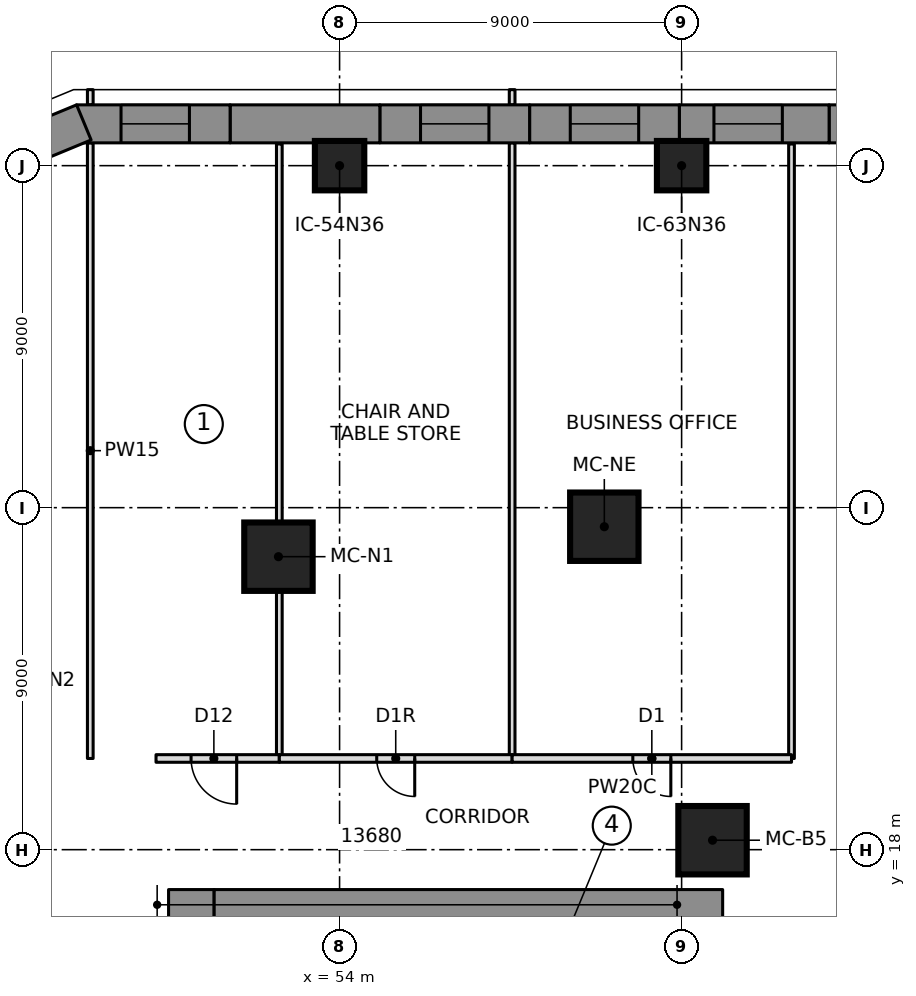
"""IFC4 building model, lengths in metres.
Left out: names, types, materials, properties, quantities, classifications, styles, units other than length and angle.
Written with IfcOpenShell. Run it as: python <this file> out.ifc"""

import sys

from ifc_helpers import new_model, si_unit, direction, frame, frame_2d, origin, origin_2d, place, context, subcontext, project, spatial, polyline, rectangle, outline, extrude, element, fill, save


model = new_model("IFC4")
c1 = context("Model", 3, precision=1e-05, world=origin(), true_north=direction((0.0, 1.0)))
c2 = subcontext(c1, "Body", "Model", "MODEL_VIEW")
j1 = project(units=[si_unit("LENGTHUNIT", "METRE"), si_unit("PLANEANGLEUNIT", "RADIAN")], contexts=[c1])
p1 = place(None, origin())
s1 = spatial("IfcSite", under=j1, at=p1, CompositionType="ELEMENT")
p2 = place(p1, origin())
s2 = spatial("IfcBuilding", under=s1, at=p2, CompositionType="ELEMENT")
p3 = place(p2, frame((0.0, 0.0, 8.0)))
s3 = spatial("IfcBuildingStorey", under=s2, at=p3, CompositionType="ELEMENT", Elevation=8.0)
p4 = place(p3, frame((50.1, 6.65, 0.0), z_axis=(0.0, 0.0, 1.0), x_axis=(0.0, 1.0, 0.0)))
e1 = element("IfcWall", 1, at=p4, inside=s3, PredefinedType="SHEAR", context=c2, shape_type="SweptSolid", body=[
    extrude(rectangle(XDim=10.3, YDim=1.2, at=frame_2d((5.15, 0.0))), origin(), (0.0, 0.0, 1.0), 5.5),
])
p5 = place(p4, frame((6.5, 0.0, 0.0)))
e2 = element("IfcOpeningElement", 2, at=p5, cuts=e1, PredefinedType="OPENING", context=c2, shape_type="SweptSolid", body=[
    extrude(rectangle(XDim=1.1, YDim=2.1, at=frame_2d((0.55, 1.05))), frame((0.0, 0.61, 0.0), z_axis=(0.0, -1.0, 0.0), x_axis=(1.0, 0.0, 0.0)), (0.0, 0.0, 1.0), 1.22),
])
p6 = place(p3, frame((50.7, 16.35, 0.0), z_axis=(0.0, 0.0, 1.0), x_axis=(1.0, 0.0, 0.0)))
e3 = element("IfcWall", 3, at=p6, inside=s3, PredefinedType="SHEAR", context=c2, shape_type="SweptSolid", body=[
    extrude(rectangle(XDim=13.38, YDim=1.2, at=frame_2d((6.69, 0.0))), origin(), (0.0, 0.0, 1.0), 5.5),
])
for number, where, z_axis, x_axis in (
    (4, (63.813, 18.249, 0.0), (0.0, 0.0, 1.0), (1.0, 0.0, 0.0)),
    (5, (60.966, 26.499, 0.0), (0.0, 0.0, 1.0), (1.0, 0.0, 0.0)),
    (6, (52.392, 25.71, 0.0), (0.0, 0.0, 1.0), (1.0, 0.0, 0.0)),
):
    element("IfcColumn", number, at=place(p3, frame(where, z_axis=z_axis, x_axis=x_axis)), inside=s3, PredefinedType="COLUMN", context=c2, shape_type="SweptSolid", body=[
        extrude(rectangle(XDim=1.8, YDim=1.8, at=origin_2d()), origin(), (0.0, 0.0, 1.0), 5.5),
    ])
for number, where, z_axis, x_axis in (
    (7, (54.0, 36.0, 0.0), (0.0, 0.0, 1.0), (1.0, 0.0, 0.0)),
    (8, (63.0, 36.0, 0.0), (0.0, 0.0, 1.0), (1.0, 0.0, 0.0)),
):
    element("IfcColumn", number, at=place(p3, frame(where, z_axis=z_axis, x_axis=x_axis)), inside=s3, PredefinedType="COLUMN", context=c2, shape_type="SweptSolid", body=[
        extrude(rectangle(XDim=1.3, YDim=1.3, at=origin_2d()), origin(), (0.0, 0.0, 1.0), 5.5),
    ])
p7 = place(p3, frame((70.821, 37.1, 0.0), z_axis=(0.0, 0.0, 1.0), x_axis=(-1.0, 0.0, 0.0)))
e9 = element("IfcWall", 9, at=p7, inside=s3, PredefinedType="NOTDEFINED", context=c2, shape_type="SweptSolid", body=[
    extrude(outline(polyline([(-0.1, -0.5), (3.94, -0.5), (3.94, 0.5), (0.1, 0.5), (-0.1, -0.5)])), origin(), (0.0, 0.0, 1.0), 5.2),
])
p8 = place(p7, frame((1.07, 0.0, 0.9)))
e10 = element("IfcOpeningElement", 10, at=p8, cuts=e9, PredefinedType="OPENING", context=c2, shape_type="SweptSolid", body=[
    extrude(rectangle(XDim=1.8, YDim=2.4, at=frame_2d((0.9, 1.2))), frame((0.0, 0.51, 0.0), z_axis=(0.0, -1.0, 0.0), x_axis=(1.0, 0.0, 0.0)), (0.0, 0.0, 1.0), 1.02),
])
p9 = place(p3, frame((66.881, 37.1, 0.0), z_axis=(0.0, 0.0, 1.0), x_axis=(-1.0, 0.0, 0.0)))
e11 = element("IfcWall", 11, at=p9, inside=s3, PredefinedType="NOTDEFINED", context=c2, shape_type="SweptSolid", body=[
    extrude(outline(polyline([(0.0, -0.5), (3.94, -0.5), (3.94, 0.5), (0.0, 0.5), (0.0, -0.5)])), origin(), (0.0, 0.0, 1.0), 5.2),
])
p10 = place(p9, frame((1.23, 0.0, 0.9)))
e12 = element("IfcOpeningElement", 12, at=p10, cuts=e11, PredefinedType="OPENING", context=c2, shape_type="SweptSolid", body=[
    extrude(rectangle(XDim=1.8, YDim=2.4, at=frame_2d((0.9, 1.2))), frame((0.0, 0.51, 0.0), z_axis=(0.0, -1.0, 0.0), x_axis=(1.0, 0.0, 0.0)), (0.0, 0.0, 1.0), 1.02),
])
p11 = place(p3, frame((62.94, 37.1, 0.0), z_axis=(0.0, 0.0, 1.0), x_axis=(-1.0, 0.0, 0.0)))
e13 = element("IfcWall", 13, at=p11, inside=s3, PredefinedType="NOTDEFINED", context=c2, shape_type="SweptSolid", body=[
    extrude(outline(polyline([(0.0, -0.5), (3.94, -0.5), (3.94, 0.5), (0.0, 0.5), (0.0, -0.5)])), origin(), (0.0, 0.0, 1.0), 5.2),
])
p12 = place(p11, frame((1.07, 0.0, 0.9)))
e14 = element("IfcOpeningElement", 14, at=p12, cuts=e13, PredefinedType="OPENING", context=c2, shape_type="SweptSolid", body=[
    extrude(rectangle(XDim=1.8, YDim=2.4, at=frame_2d((0.9, 1.2))), frame((0.0, 0.51, 0.0), z_axis=(0.0, -1.0, 0.0), x_axis=(1.0, 0.0, 0.0)), (0.0, 0.0, 1.0), 1.02),
])
p13 = place(p3, frame((59.0, 37.1, 0.0), z_axis=(0.0, 0.0, 1.0), x_axis=(-1.0, 0.0, 0.0)))
e15 = element("IfcWall", 15, at=p13, inside=s3, PredefinedType="NOTDEFINED", context=c2, shape_type="SweptSolid", body=[
    extrude(outline(polyline([(0.0, -0.5), (3.94, -0.5), (3.94, 0.5), (0.0, 0.5), (0.0, -0.5)])), origin(), (0.0, 0.0, 1.0), 5.2),
])
p14 = place(p13, frame((1.07, 0.0, 0.9)))
e16 = element("IfcOpeningElement", 16, at=p14, cuts=e15, PredefinedType="OPENING", context=c2, shape_type="SweptSolid", body=[
    extrude(rectangle(XDim=1.8, YDim=2.4, at=frame_2d((0.9, 1.2))), frame((0.0, 0.51, 0.0), z_axis=(0.0, -1.0, 0.0), x_axis=(1.0, 0.0, 0.0)), (0.0, 0.0, 1.0), 1.02),
])
p15 = place(p3, frame((55.06, 37.1, 0.0), z_axis=(0.0, 0.0, 1.0), x_axis=(-1.0, 0.0, 0.0)))
e17 = element("IfcWall", 17, at=p15, inside=s3, PredefinedType="NOTDEFINED", context=c2, shape_type="SweptSolid", body=[
    extrude(outline(polyline([(0.0, -0.5), (3.94, -0.5), (3.94, 0.5), (0.0, 0.5), (0.0, -0.5)])), origin(), (0.0, 0.0, 1.0), 5.2),
])
p16 = place(p3, frame((51.119, 37.1, 0.0), z_axis=(0.0, 0.0, 1.0), x_axis=(-1.0, 0.0, 0.0)))
e18 = element("IfcWall", 18, at=p16, inside=s3, PredefinedType="NOTDEFINED", context=c2, shape_type="SweptSolid", body=[
    extrude(outline(polyline([(0.0, -0.5), (4.04, -0.5), (3.841, 0.5), (0.0, 0.5), (0.0, -0.5)])), origin(), (0.0, 0.0, 1.0), 5.2),
])
p17 = place(p16, frame((1.07, 0.0, 0.9)))
e19 = element("IfcOpeningElement", 19, at=p17, cuts=e18, PredefinedType="OPENING", context=c2, shape_type="SweptSolid", body=[
    extrude(rectangle(XDim=1.8, YDim=2.4, at=frame_2d((0.9, 1.2))), frame((0.0, 0.51, 0.0), z_axis=(0.0, -1.0, 0.0), x_axis=(1.0, 0.0, 0.0)), (0.0, 0.0, 1.0), 1.02),
])
p18 = place(p3, frame((47.179, 37.1, 0.0), z_axis=(0.0, 0.0, 1.0), x_axis=(-0.923862365102, -0.382724875529, 0.0)))
e20 = element("IfcWall", 20, at=p18, inside=s3, PredefinedType="NOTDEFINED", context=c2, shape_type="SweptSolid", body=[
    extrude(outline(polyline([(-0.1, -0.5), (3.482, -0.5), (3.068, 0.5), (0.1, 0.5), (-0.1, -0.5)])), origin(), (0.0, 0.0, 1.0), 5.2),
])
p19 = place(p3, frame((47.44, 20.4, 0.0), z_axis=(0.0, 0.0, 1.0), x_axis=(0.0, 1.0, 0.0)))
e21 = element("IfcWall", 21, at=p19, inside=s3, PredefinedType="PARTITIONING", context=c2, shape_type="SweptSolid", body=[
    extrude(rectangle(XDim=16.2, YDim=0.15, at=frame_2d((8.1, 0.0))), origin(), (0.0, 0.0, 1.0), 5.15),
])
p20 = place(p3, frame((47.44, 37.6, 0.0), z_axis=(0.0, 0.0, 1.0), x_axis=(0.0, 1.0, 0.0)))
e22 = element("IfcWall", 22, at=p20, inside=s3, PredefinedType="PARTITIONING", context=c2, shape_type="SweptSolid", body=[
    extrude(rectangle(XDim=0.4, YDim=0.15, at=frame_2d((0.2, 0.0))), origin(), (0.0, 0.0, 1.0), 5.15),
])
p21 = place(p3, frame((52.414, 20.4, 0.0), z_axis=(0.0, 0.0, 1.0), x_axis=(0.0, 1.0, 0.0)))
e23 = element("IfcWall", 23, at=p21, inside=s3, PredefinedType="PARTITIONING", context=c2, shape_type="SweptSolid", body=[
    extrude(rectangle(XDim=16.17, YDim=0.15, at=frame_2d((8.085, 0.0))), origin(), (0.0, 0.0, 1.0), 5.15),
])
p22 = place(p3, frame((58.541, 20.4, 0.0), z_axis=(0.0, 0.0, 1.0), x_axis=(0.0, 1.0, 0.0)))
e24 = element("IfcWall", 24, at=p22, inside=s3, PredefinedType="PARTITIONING", context=c2, shape_type="SweptSolid", body=[
    extrude(rectangle(XDim=16.2, YDim=0.15, at=frame_2d((8.1, 0.0))), origin(), (0.0, 0.0, 1.0), 5.15),
])
p23 = place(p3, frame((58.541, 37.6, 0.0), z_axis=(0.0, 0.0, 1.0), x_axis=(0.0, 1.0, 0.0)))
e25 = element("IfcWall", 25, at=p23, inside=s3, PredefinedType="PARTITIONING", context=c2, shape_type="SweptSolid", body=[
    extrude(rectangle(XDim=0.4, YDim=0.15, at=frame_2d((0.2, 0.0))), origin(), (0.0, 0.0, 1.0), 5.15),
])
p24 = place(p3, frame((65.892, 20.4, 0.0), z_axis=(0.0, 0.0, 1.0), x_axis=(0.0, 1.0, 0.0)))
e26 = element("IfcWall", 26, at=p24, inside=s3, PredefinedType="PARTITIONING", context=c2, shape_type="SweptSolid", body=[
    extrude(rectangle(XDim=16.17, YDim=0.15, at=frame_2d((8.085, 0.0))), origin(), (0.0, 0.0, 1.0), 5.15),
])
p25 = place(p3, frame((52.414, 20.4, 0.0), z_axis=(0.0, 0.0, 1.0), x_axis=(-1.0, 0.0, 0.0)))
e27 = element("IfcWall", 27, at=p25, inside=s3, PredefinedType="PARTITIONING", context=c2, shape_type="SweptSolid", body=[
    extrude(rectangle(XDim=3.244, YDim=0.2, at=frame_2d((1.622, 0.0))), origin(), (0.0, 0.0, 1.0), 5.15),
])
p26 = place(p25, frame((1.122, 0.0, 0.0)))
e28 = element("IfcOpeningElement", 28, at=p26, cuts=e27, PredefinedType="OPENING", context=c2, shape_type="SweptSolid", body=[
    extrude(rectangle(XDim=1.2, YDim=2.1, at=frame_2d((0.6, 1.05))), frame((0.0, 0.11, 0.0), z_axis=(0.0, -1.0, 0.0), x_axis=(1.0, 0.0, 0.0)), (0.0, 0.0, 1.0), 0.22),
])
p27 = place(p3, frame((58.541, 20.4, 0.0), z_axis=(0.0, 0.0, 1.0), x_axis=(-1.0, 0.0, 0.0)))
e29 = element("IfcWall", 29, at=p27, inside=s3, PredefinedType="PARTITIONING", context=c2, shape_type="SweptSolid", body=[
    extrude(rectangle(XDim=6.126, YDim=0.2, at=frame_2d((3.063, 0.0))), origin(), (0.0, 0.0, 1.0), 5.15),
])
p28 = place(p27, frame((2.563, 0.0, 0.0)))
e30 = element("IfcOpeningElement", 30, at=p28, cuts=e29, PredefinedType="OPENING", context=c2, shape_type="SweptSolid", body=[
    extrude(rectangle(XDim=1.0, YDim=2.1, at=frame_2d((0.5, 1.05))), frame((0.0, 0.11, 0.0), z_axis=(0.0, -1.0, 0.0), x_axis=(1.0, 0.0, 0.0)), (0.0, 0.0, 1.0), 0.22),
])
p29 = place(p3, frame((65.892, 20.4, 0.0), z_axis=(0.0, 0.0, 1.0), x_axis=(-1.0, 0.0, 0.0)))
e31 = element("IfcWall", 31, at=p29, inside=s3, PredefinedType="PARTITIONING", context=c2, shape_type="SweptSolid", body=[
    extrude(rectangle(XDim=7.351, YDim=0.2, at=frame_2d((3.676, 0.0))), origin(), (0.0, 0.0, 1.0), 5.15),
])
p30 = place(p29, frame((3.176, 0.0, 0.0)))
e32 = element("IfcOpeningElement", 32, at=p30, cuts=e31, PredefinedType="OPENING", context=c2, shape_type="SweptSolid", body=[
    extrude(rectangle(XDim=1.0, YDim=2.1, at=frame_2d((0.5, 1.05))), frame((0.0, 0.11, 0.0), z_axis=(0.0, -1.0, 0.0), x_axis=(1.0, 0.0, 0.0)), (0.0, 0.0, 1.0), 0.22),
])
p31 = place(p10, origin())
e33 = element("IfcWindow", 33, at=p31, inside=s3, PartitioningType="SINGLE_PANEL", PredefinedType="WINDOW", context=c2, shape_type="SweptSolid", body=[
    extrude(rectangle(XDim=1.8, YDim=2.4, at=frame_2d((0.9, 1.2))), frame((0.0, 0.5, 0.0), z_axis=(0.0, -1.0, 0.0), x_axis=(1.0, 0.0, 0.0)), (0.0, 0.0, 1.0), 0.06),
])
fill(e12, e33)
p32 = place(p12, origin())
e34 = element("IfcWindow", 34, at=p32, inside=s3, PartitioningType="SINGLE_PANEL", PredefinedType="WINDOW", context=c2, shape_type="SweptSolid", body=[
    extrude(rectangle(XDim=1.8, YDim=2.4, at=frame_2d((0.9, 1.2))), frame((0.0, 0.5, 0.0), z_axis=(0.0, -1.0, 0.0), x_axis=(1.0, 0.0, 0.0)), (0.0, 0.0, 1.0), 0.06),
])
fill(e14, e34)
p33 = place(p14, origin())
e35 = element("IfcWindow", 35, at=p33, inside=s3, PartitioningType="SINGLE_PANEL", PredefinedType="WINDOW", context=c2, shape_type="SweptSolid", body=[
    extrude(rectangle(XDim=1.8, YDim=2.4, at=frame_2d((0.9, 1.2))), frame((0.0, 0.5, 0.0), z_axis=(0.0, -1.0, 0.0), x_axis=(1.0, 0.0, 0.0)), (0.0, 0.0, 1.0), 0.06),
])
fill(e16, e35)
p34 = place(p17, origin())
e36 = element("IfcWindow", 36, at=p34, inside=s3, PartitioningType="SINGLE_PANEL", PredefinedType="WINDOW", context=c2, shape_type="SweptSolid", body=[
    extrude(rectangle(XDim=1.8, YDim=2.4, at=frame_2d((0.9, 1.2))), frame((0.0, 0.5, 0.0), z_axis=(0.0, -1.0, 0.0), x_axis=(1.0, 0.0, 0.0)), (0.0, 0.0, 1.0), 0.06),
])
fill(e19, e36)
p35 = place(p26, origin())
e37 = element("IfcDoor", 37, at=p35, inside=s3, OperationType="SINGLE_SWING_RIGHT", PredefinedType="DOOR", context=c2, shape_type="SweptSolid", body=[
    extrude(rectangle(XDim=1.2, YDim=2.1, at=frame_2d((0.6, 1.05))), frame((0.0, 0.025, 0.0), z_axis=(0.0, -1.0, 0.0), x_axis=(1.0, 0.0, 0.0)), (0.0, 0.0, 1.0), 0.05),
])
fill(e28, e37)
p36 = place(p28, origin())
e38 = element("IfcDoor", 38, at=p36, inside=s3, OperationType="SINGLE_SWING_RIGHT", PredefinedType="DOOR", context=c2, shape_type="SweptSolid", body=[
    extrude(rectangle(XDim=1.0, YDim=2.1, at=frame_2d((0.5, 1.05))), frame((0.0, 0.025, 0.0), z_axis=(0.0, -1.0, 0.0), x_axis=(1.0, 0.0, 0.0)), (0.0, 0.0, 1.0), 0.05),
])
fill(e30, e38)
p37 = place(p30, origin())
e39 = element("IfcDoor", 39, at=p37, inside=s3, OperationType="SINGLE_SWING_LEFT", PredefinedType="DOOR", context=c2, shape_type="SweptSolid", body=[
    extrude(rectangle(XDim=1.0, YDim=2.1, at=frame_2d((0.5, 1.05))), frame((0.0, 0.025, 0.0), z_axis=(0.0, -1.0, 0.0), x_axis=(1.0, 0.0, 0.0)), (0.0, 0.0, 1.0), 0.05),
])
fill(e32, e39)
save(model, sys.argv[1])
